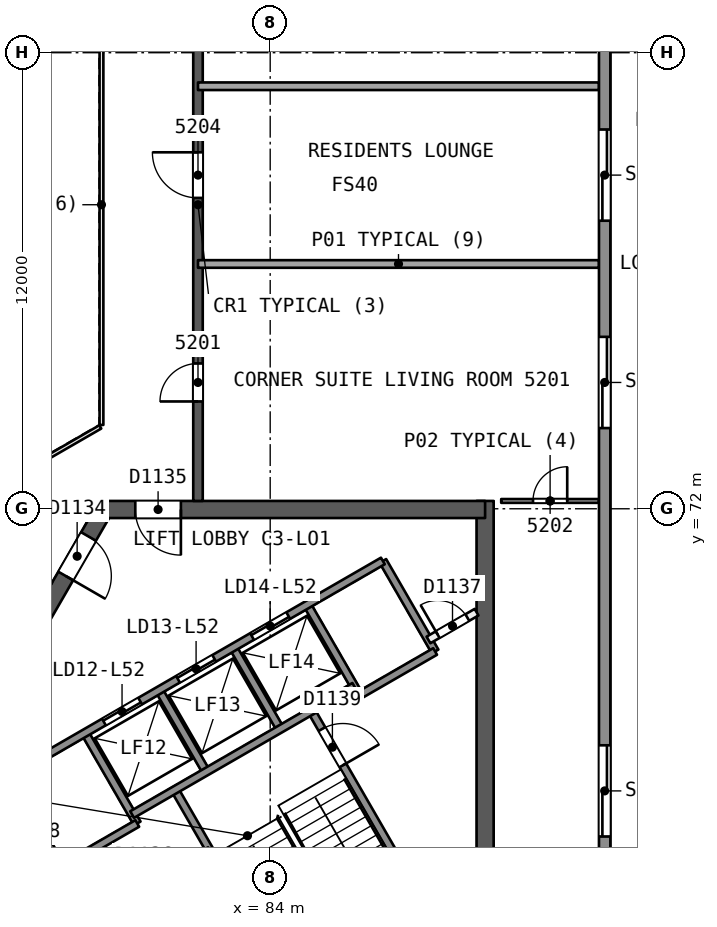
"""IFC4 building model, lengths in metres.
Left out: names, types, materials, properties, quantities, classifications, styles, units other than length and angle.
Written with IfcOpenShell. Run it as: python <this file> out.ifc"""

import sys

from ifc_helpers import new_model, si_unit, direction, frame, frame_2d, origin, place, context, subcontext, project, spatial, rectangle, extrude, element, fill, save


model = new_model("IFC4")
c1 = context("Model", 3, precision=1e-05, world=origin(), true_north=direction((0.0, 1.0)))
c2 = subcontext(c1, "Body", "Model", "MODEL_VIEW")
j1 = project(units=[si_unit("LENGTHUNIT", "METRE"), si_unit("PLANEANGLEUNIT", "RADIAN")], contexts=[c1])
p1 = place(None, origin())
s1 = spatial("IfcSite", under=j1, at=p1, CompositionType="ELEMENT")
p2 = place(p1, origin())
s2 = spatial("IfcBuilding", under=s1, at=p2, CompositionType="ELEMENT")
p3 = place(p2, frame((0.0, 0.0, 213.2)))
s3 = spatial("IfcBuildingStorey", under=s2, at=p3, CompositionType="ELEMENT", Elevation=213.2)
p4 = place(p3, frame((79.63, 71.981, 0.0), z_axis=(0.0, 0.0, 1.0), x_axis=(-0.500002171595, -0.86602415001, 0.0)))
e1 = element("IfcWall", 1, at=p4, inside=s3, PredefinedType="SHEAR", context=c2, shape_type="SweptSolid", body=[
    extrude(rectangle(XDim=10.25, YDim=0.45, at=frame_2d((5.125, 0.0))), origin(), (0.0, 0.0, 1.0), 3.7),
])
p5 = place(p4, frame((0.82, 0.0, 0.0)))
e2 = element("IfcOpeningElement", 2, at=p5, cuts=e1, PredefinedType="OPENING", context=c2, shape_type="SweptSolid", body=[
    extrude(rectangle(XDim=1.2, YDim=2.1, at=frame_2d((0.6, 1.05))), frame((0.0, 0.235, 0.0), z_axis=(0.0, -1.0, 0.0), x_axis=(1.0, 0.0, 0.0)), (0.0, 0.0, 1.0), 0.471),
])
p6 = place(p3, frame((74.617, 63.299, 0.0), z_axis=(0.0, 0.0, 1.0), x_axis=(0.86602594008, -0.499999071108, 0.0)))
e3 = element("IfcWall", 3, at=p6, inside=s3, PredefinedType="SHEAR", context=c2, shape_type="SweptSolid", body=[
    extrude(rectangle(XDim=14.108, YDim=0.45, at=frame_2d((7.054, 0.0))), origin(), (0.0, 0.0, 1.0), 3.7),
])
p7 = place(p3, frame((89.655, 58.002, 0.0), z_axis=(0.0, 0.0, 1.0), x_axis=(0.0, 1.0, 0.0)))
e4 = element("IfcWall", 4, at=p7, inside=s3, PredefinedType="SHEAR", context=c2, shape_type="SweptSolid", body=[
    extrude(rectangle(XDim=14.204, YDim=0.45, at=frame_2d((7.102, 0.0))), origin(), (0.0, 0.0, 1.0), 3.7),
])
p8 = place(p3, frame((89.655, 71.981, 0.0), z_axis=(0.0, 0.0, 1.0), x_axis=(-1.0, 0.0, 0.0)))
e5 = element("IfcWall", 5, at=p8, inside=s3, PredefinedType="SHEAR", context=c2, shape_type="SweptSolid", body=[
    extrude(rectangle(XDim=10.155, YDim=0.45, at=frame_2d((5.078, 0.0))), origin(), (0.0, 0.0, 1.0), 3.7),
])
p9 = place(p8, frame((8.005, 0.0, 0.0)))
e6 = element("IfcOpeningElement", 6, at=p9, cuts=e5, PredefinedType="OPENING", context=c2, shape_type="SweptSolid", body=[
    extrude(rectangle(XDim=1.2, YDim=2.1, at=frame_2d((0.6, 1.05))), frame((0.0, 0.235, 0.0), z_axis=(0.0, -1.0, 0.0), x_axis=(1.0, 0.0, 0.0)), (0.0, 0.0, 1.0), 0.471),
])
p10 = place(p3, frame((82.1, 72.206, 0.0), z_axis=(0.0, 0.0, 1.0), x_axis=(0.0, 1.0, 0.0)))
e7 = element("IfcWall", 7, at=p10, inside=s3, PredefinedType="SHEAR", context=c2, shape_type="SweptSolid", body=[
    extrude(rectangle(XDim=15.588, YDim=0.25, at=frame_2d((7.794, 0.0))), origin(), (0.0, 0.0, 1.0), 3.3),
])
p11 = place(p10, frame((2.618, 0.0, 0.0)))
e8 = element("IfcOpeningElement", 8, at=p11, cuts=e7, PredefinedType="OPENING", context=c2, shape_type="SweptSolid", body=[
    extrude(rectangle(XDim=1.0, YDim=2.1, at=frame_2d((0.5, 1.05))), frame((0.0, 0.135, 0.0), z_axis=(0.0, -1.0, 0.0), x_axis=(1.0, 0.0, 0.0)), (0.0, 0.0, 1.0), 0.271),
])
p12 = place(p10, frame((7.974, 0.0, 0.0)))
e9 = element("IfcOpeningElement", 9, at=p12, cuts=e7, PredefinedType="OPENING", context=c2, shape_type="SweptSolid", body=[
    extrude(rectangle(XDim=1.2, YDim=2.4, at=frame_2d((0.6, 1.2))), frame((0.0, 0.135, 0.0), z_axis=(0.0, -1.0, 0.0), x_axis=(1.0, 0.0, 0.0)), (0.0, 0.0, 1.0), 0.271),
])
p13 = place(p10, frame((12.65, 0.0, 0.0)))
e10 = element("IfcOpeningElement", 10, at=p13, cuts=e7, PredefinedType="OPENING", context=c2, shape_type="SweptSolid", body=[
    extrude(rectangle(XDim=1.2, YDim=2.4, at=frame_2d((0.6, 1.2))), frame((0.0, 0.135, 0.0), z_axis=(0.0, -1.0, 0.0), x_axis=(1.0, 0.0, 0.0)), (0.0, 0.0, 1.0), 0.271),
])
p14 = place(p3, frame((90.079, 72.206, 0.0), z_axis=(0.0, 0.0, 1.0), x_axis=(1.0, 0.0, 0.0)))
e11 = element("IfcWall", 11, at=p14, inside=s3, PredefinedType="PARTITIONING", context=c2, shape_type="SweptSolid", body=[
    extrude(rectangle(XDim=2.573, YDim=0.1, at=frame_2d((1.287, 0.0))), origin(), (0.0, 0.0, 1.0), 3.3),
])
p15 = place(p14, frame((0.837, 0.0, 0.0)))
e12 = element("IfcOpeningElement", 12, at=p15, cuts=e11, PredefinedType="OPENING", context=c2, shape_type="SweptSolid", body=[
    extrude(rectangle(XDim=0.9, YDim=2.1, at=frame_2d((0.45, 1.05))), frame((0.0, 0.061, 0.0), z_axis=(0.0, -1.0, 0.0), x_axis=(1.0, 0.0, 0.0)), (0.0, 0.0, 1.0), 0.121),
])
for number, where, z_axis, x_axis in (
    (13, (92.652, 78.441, 0.0), (0.0, 0.0, 1.0), (-1.0, 0.0, 0.0)),
    (14, (92.652, 83.118, 0.0), (0.0, 0.0, 1.0), (-1.0, 0.0, 0.0)),
):
    element("IfcWall", number, at=place(p3, frame(where, z_axis=z_axis, x_axis=x_axis)), inside=s3, PredefinedType="PARTITIONING", context=c2, shape_type="SweptSolid", body=[
        extrude(rectangle(XDim=10.552, YDim=0.2, at=frame_2d((5.276, 0.0))), origin(), (0.0, 0.0, 1.0), 3.3),
    ])
p16 = place(p3, frame((92.801, 105.596, 0.0), z_axis=(0.0, 0.0, 1.0), x_axis=(0.0, -1.0, 0.0)))
e15 = element("IfcWall", 15, at=p16, inside=s3, PredefinedType="SOLIDWALL", context=c2, shape_type="SweptSolid", body=[
    extrude(rectangle(XDim=51.191, YDim=0.3, at=frame_2d((25.596, 0.0))), origin(), (0.0, 0.0, 1.0), 3.3),
])
p17 = place(p16, frame((9.996, 0.0, 0.0)))
e16 = element("IfcOpeningElement", 16, at=p17, cuts=e15, PredefinedType="OPENING", context=c2, shape_type="SweptSolid", body=[
    extrude(rectangle(XDim=2.4, YDim=2.4, at=frame_2d((1.2, 1.2))), frame((0.0, 0.161, 0.0), z_axis=(0.0, -1.0, 0.0), x_axis=(1.0, 0.0, 0.0)), (0.0, 0.0, 1.0), 0.321),
])
p18 = place(p16, frame((29.072, 0.0, 0.0)))
e17 = element("IfcOpeningElement", 17, at=p18, cuts=e15, PredefinedType="OPENING", context=c2, shape_type="SweptSolid", body=[
    extrude(rectangle(XDim=2.4, YDim=2.4, at=frame_2d((1.2, 1.2))), frame((0.0, 0.161, 0.0), z_axis=(0.0, -1.0, 0.0), x_axis=(1.0, 0.0, 0.0)), (0.0, 0.0, 1.0), 0.321),
])
p19 = place(p16, frame((39.819, 0.0, 0.0)))
e18 = element("IfcOpeningElement", 18, at=p19, cuts=e15, PredefinedType="OPENING", context=c2, shape_type="SweptSolid", body=[
    extrude(rectangle(XDim=2.4, YDim=2.4, at=frame_2d((1.2, 1.2))), frame((0.0, 0.161, 0.0), z_axis=(0.0, -1.0, 0.0), x_axis=(1.0, 0.0, 0.0)), (0.0, 0.0, 1.0), 0.321),
])
p20 = place(p16, frame((23.616, 0.0, 0.0)))
e19 = element("IfcOpeningElement", 19, at=p20, cuts=e15, PredefinedType="OPENING", context=c2, shape_type="SweptSolid", body=[
    extrude(rectangle(XDim=2.4, YDim=2.4, at=frame_2d((1.2, 1.2))), frame((0.0, 0.161, 0.0), z_axis=(0.0, -1.0, 0.0), x_axis=(1.0, 0.0, 0.0)), (0.0, 0.0, 1.0), 0.321),
])
p21 = place(p3, frame((43.933, 82.619, 0.0), z_axis=(0.0, 0.0, 1.0), x_axis=(0.866026349667, 0.49999836168, 0.0)))
e20 = element("IfcWall", 20, at=p21, inside=s3, PredefinedType="SOLIDWALL", context=c2, shape_type="SweptSolid", body=[
    extrude(rectangle(XDim=51.192, YDim=0.3, at=frame_2d((25.596, 0.0))), origin(), (0.0, 0.0, 1.0), 3.3),
])
p22 = place(p21, frame((24.552, 0.0, 0.0)))
e21 = element("IfcOpeningElement", 21, at=p22, cuts=e20, PredefinedType="OPENING", context=c2, shape_type="SweptSolid", body=[
    extrude(rectangle(XDim=2.4, YDim=2.4, at=frame_2d((1.2, 1.2))), frame((0.0, 0.161, 0.0), z_axis=(0.0, -1.0, 0.0), x_axis=(1.0, 0.0, 0.0)), (0.0, 0.0, 1.0), 0.321),
])
p23 = place(p21, frame((29.228, 0.0, 0.0)))
e22 = element("IfcOpeningElement", 22, at=p23, cuts=e20, PredefinedType="OPENING", context=c2, shape_type="SweptSolid", body=[
    extrude(rectangle(XDim=2.4, YDim=2.4, at=frame_2d((1.2, 1.2))), frame((0.0, 0.161, 0.0), z_axis=(0.0, -1.0, 0.0), x_axis=(1.0, 0.0, 0.0)), (0.0, 0.0, 1.0), 0.321),
])
p24 = place(p21, frame((39.819, 0.0, 0.0)))
e23 = element("IfcOpeningElement", 23, at=p24, cuts=e20, PredefinedType="OPENING", context=c2, shape_type="SweptSolid", body=[
    extrude(rectangle(XDim=2.4, YDim=2.4, at=frame_2d((1.2, 1.2))), frame((0.0, 0.161, 0.0), z_axis=(0.0, -1.0, 0.0), x_axis=(1.0, 0.0, 0.0)), (0.0, 0.0, 1.0), 0.321),
])
p25 = place(p21, frame((19.719, 0.0, 0.0)))
e24 = element("IfcOpeningElement", 24, at=p25, cuts=e20, PredefinedType="OPENING", context=c2, shape_type="SweptSolid", body=[
    extrude(rectangle(XDim=2.4, YDim=2.4, at=frame_2d((1.2, 1.2))), frame((0.0, 0.161, 0.0), z_axis=(0.0, -1.0, 0.0), x_axis=(1.0, 0.0, 0.0)), (0.0, 0.0, 1.0), 0.321),
])
p26 = place(p21, frame((8.993, 0.0, 0.0)))
e25 = element("IfcOpeningElement", 25, at=p26, cuts=e20, PredefinedType="OPENING", context=c2, shape_type="SweptSolid", body=[
    extrude(rectangle(XDim=2.4, YDim=2.4, at=frame_2d((1.2, 1.2))), frame((0.0, 0.161, 0.0), z_axis=(0.0, -1.0, 0.0), x_axis=(1.0, 0.0, 0.0)), (0.0, 0.0, 1.0), 0.321),
])
p27 = place(p3, frame((88.266, 51.786, 0.0), z_axis=(0.0, 0.0, 1.0), x_axis=(-0.866026349667, 0.49999836168, 0.0)))
e26 = element("IfcWall", 26, at=p27, inside=s3, PredefinedType="SOLIDWALL", context=c2, shape_type="SweptSolid", body=[
    extrude(rectangle(XDim=51.192, YDim=0.3, at=frame_2d((25.596, 0.0))), origin(), (0.0, 0.0, 1.0), 3.3),
])
p28 = place(p27, frame((24.864, 0.0, 0.0)))
e27 = element("IfcOpeningElement", 27, at=p28, cuts=e26, PredefinedType="OPENING", context=c2, shape_type="SweptSolid", body=[
    extrude(rectangle(XDim=2.4, YDim=2.4, at=frame_2d((1.2, 1.2))), frame((0.0, 0.161, 0.0), z_axis=(0.0, -1.0, 0.0), x_axis=(1.0, 0.0, 0.0)), (0.0, 0.0, 1.0), 0.321),
])
p29 = place(p27, frame((19.719, 0.0, 0.0)))
e28 = element("IfcOpeningElement", 28, at=p29, cuts=e26, PredefinedType="OPENING", context=c2, shape_type="SweptSolid", body=[
    extrude(rectangle(XDim=2.4, YDim=2.4, at=frame_2d((1.2, 1.2))), frame((0.0, 0.161, 0.0), z_axis=(0.0, -1.0, 0.0), x_axis=(1.0, 0.0, 0.0)), (0.0, 0.0, 1.0), 0.321),
])
p30 = place(p27, frame((8.993, 0.0, 0.0)))
e29 = element("IfcOpeningElement", 29, at=p30, cuts=e26, PredefinedType="OPENING", context=c2, shape_type="SweptSolid", body=[
    extrude(rectangle(XDim=2.4, YDim=2.4, at=frame_2d((1.2, 1.2))), frame((0.0, 0.161, 0.0), z_axis=(0.0, -1.0, 0.0), x_axis=(1.0, 0.0, 0.0)), (0.0, 0.0, 1.0), 0.321),
])
p31 = place(p27, frame((38.484, 0.0, 0.0)))
e30 = element("IfcOpeningElement", 30, at=p31, cuts=e26, PredefinedType="OPENING", context=c2, shape_type="SweptSolid", body=[
    extrude(rectangle(XDim=2.4, YDim=2.4, at=frame_2d((1.2, 1.2))), frame((0.0, 0.161, 0.0), z_axis=(0.0, -1.0, 0.0), x_axis=(1.0, 0.0, 0.0)), (0.0, 0.0, 1.0), 0.321),
])
for number, where, z_axis, x_axis in (
    (31, (77.135, 64.952, 0.0), (0.0, 0.0, 1.0), (0.5, -0.866, 0.0)),
    (32, (79.127, 66.102, 0.0), (0.0, 0.0, 1.0), (0.5, -0.866, 0.0)),
):
    element("IfcWall", number, at=place(p3, frame(where, z_axis=z_axis, x_axis=x_axis)), inside=s3, PredefinedType="SOLIDWALL", context=c2, shape_type="SweptSolid", body=[
        extrude(rectangle(XDim=2.75, YDim=0.2, at=frame_2d((1.375, 0.0))), origin(), (0.0, 0.0, 1.0), 3.3),
    ])
p32 = place(p3, frame((81.493, 64.604, 0.0), z_axis=(0.0, 0.0, 1.0), x_axis=(0.500006057782, -0.866021906294, 0.0)))
e33 = element("IfcWall", 33, at=p32, inside=s3, PredefinedType="SOLIDWALL", context=c2, shape_type="SweptSolid", body=[
    extrude(rectangle(XDim=7.7, YDim=0.2, at=frame_2d((3.85, 0.0))), origin(), (0.0, 0.0, 1.0), 3.3),
])
for number, where, z_axis, x_axis in (
    (34, (81.076, 67.227, 0.0), (0.0, 0.0, 1.0), (0.5, -0.866, 0.0)),
    (35, (83.024, 68.352, 0.0), (0.0, 0.0, 1.0), (0.5, -0.866, 0.0)),
):
    element("IfcWall", number, at=place(p3, frame(where, z_axis=z_axis, x_axis=x_axis)), inside=s3, PredefinedType="SOLIDWALL", context=c2, shape_type="SweptSolid", body=[
        extrude(rectangle(XDim=2.48, YDim=0.2, at=frame_2d((1.24, 0.0))), origin(), (0.0, 0.0, 1.0), 3.3),
    ])
p33 = place(p3, frame((85.087, 66.679, 0.0), z_axis=(0.0, 0.0, 1.0), x_axis=(0.500019787375, -0.866013979237, 0.0)))
e36 = element("IfcWall", 36, at=p33, inside=s3, PredefinedType="SOLIDWALL", context=c2, shape_type="SweptSolid", body=[
    extrude(rectangle(XDim=7.7, YDim=0.2, at=frame_2d((3.85, 0.0))), origin(), (0.0, 0.0, 1.0), 3.3),
])
p34 = place(p33, frame((0.55, 0.0, 0.0)))
e37 = element("IfcOpeningElement", 37, at=p34, cuts=e36, PredefinedType="OPENING", context=c2, shape_type="SweptSolid", body=[
    extrude(rectangle(XDim=1.1, YDim=2.1, at=frame_2d((0.55, 1.05))), frame((0.0, 0.11, 0.0), z_axis=(0.0, -1.0, 0.0), x_axis=(1.0, 0.0, 0.0)), (0.0, 0.0, 1.0), 0.221),
])
for number, where, z_axis, x_axis in (
    (38, (84.973, 69.477, 0.0), (0.0, 0.0, 1.0), (0.5, -0.866, 0.0)),
    (39, (86.965, 70.626, 0.0), (0.0, 0.0, 1.0), (0.5, -0.866, 0.0)),
):
    element("IfcWall", number, at=place(p3, frame(where, z_axis=z_axis, x_axis=x_axis)), inside=s3, PredefinedType="SOLIDWALL", context=c2, shape_type="SweptSolid", body=[
        extrude(rectangle(XDim=2.75, YDim=0.2, at=frame_2d((1.375, 0.0))), origin(), (0.0, 0.0, 1.0), 3.3),
    ])
p35 = place(p3, frame((77.135, 64.952, 0.0), z_axis=(0.0, 0.0, 1.0), x_axis=(0.866031916153, 0.499988720078, 0.0)))
e40 = element("IfcWall", 40, at=p35, inside=s3, PredefinedType="SOLIDWALL", context=c2, shape_type="SweptSolid", body=[
    extrude(rectangle(XDim=11.35, YDim=0.2, at=frame_2d((5.675, 0.0))), origin(), (0.0, 0.0, 1.0), 3.3),
])
p36 = place(p35, frame((2.875, 0.0, 0.0)))
e41 = element("IfcOpeningElement", 41, at=p36, cuts=e40, PredefinedType="OPENING", context=c2, shape_type="SweptSolid", body=[
    extrude(rectangle(XDim=1.1, YDim=2.1, at=frame_2d((0.55, 1.05))), frame((0.0, 0.11, 0.0), z_axis=(0.0, -1.0, 0.0), x_axis=(1.0, 0.0, 0.0)), (0.0, 0.0, 1.0), 0.221),
])
p37 = place(p35, frame((5.125, 0.0, 0.0)))
e42 = element("IfcOpeningElement", 42, at=p37, cuts=e40, PredefinedType="OPENING", context=c2, shape_type="SweptSolid", body=[
    extrude(rectangle(XDim=1.1, YDim=2.1, at=frame_2d((0.55, 1.05))), frame((0.0, 0.11, 0.0), z_axis=(0.0, -1.0, 0.0), x_axis=(1.0, 0.0, 0.0)), (0.0, 0.0, 1.0), 0.221),
])
p38 = place(p35, frame((7.375, 0.0, 0.0)))
e43 = element("IfcOpeningElement", 43, at=p38, cuts=e40, PredefinedType="OPENING", context=c2, shape_type="SweptSolid", body=[
    extrude(rectangle(XDim=1.1, YDim=2.1, at=frame_2d((0.55, 1.05))), frame((0.0, 0.11, 0.0), z_axis=(0.0, -1.0, 0.0), x_axis=(1.0, 0.0, 0.0)), (0.0, 0.0, 1.0), 0.221),
])
p39 = place(p3, frame((88.165, 68.548, 0.0), z_axis=(0.0, 0.0, 1.0), x_axis=(0.866013036001, 0.500021421018, 0.0)))
e44 = element("IfcWall", 44, at=p39, inside=s3, PredefinedType="PARTITIONING", context=c2, shape_type="SweptSolid", body=[
    extrude(rectangle(XDim=1.461, YDim=0.2, at=frame_2d((0.73, 0.0))), origin(), (0.0, 0.0, 1.0), 3.3),
])
p40 = place(p39, frame((0.281, 0.0, 0.0)))
e45 = element("IfcOpeningElement", 45, at=p40, cuts=e44, PredefinedType="OPENING", context=c2, shape_type="SweptSolid", body=[
    extrude(rectangle(XDim=0.9, YDim=2.1, at=frame_2d((0.45, 1.05))), frame((0.0, 0.11, 0.0), z_axis=(0.0, -1.0, 0.0), x_axis=(1.0, 0.0, 0.0)), (0.0, 0.0, 1.0), 0.221),
])
p41 = place(p3, frame((80.367, 63.954, 0.0), z_axis=(0.0, 0.0, 1.0), x_axis=(0.866026575979, 0.499997969693, 0.0)))
e46 = element("IfcWall", 46, at=p41, inside=s3, PredefinedType="SOLIDWALL", context=c2, shape_type="SweptSolid", body=[
    extrude(rectangle(XDim=6.75, YDim=0.2, at=frame_2d((3.375, 0.0))), origin(), (0.0, 0.0, 1.0), 3.3),
])
p42 = place(p3, frame((78.51, 62.57, 0.0), z_axis=(0.0, 0.0, 1.0), x_axis=(0.866053019151, 0.499952165731, 0.0)))
e47 = element("IfcWall", 47, at=p42, inside=s3, PredefinedType="SOLIDWALL", context=c2, shape_type="SweptSolid", body=[
    extrude(rectangle(XDim=2.3, YDim=0.2, at=frame_2d((1.15, 0.0))), origin(), (0.0, 0.0, 1.0), 3.3),
])
p43 = place(p3, frame((86.348, 67.095, 0.0), z_axis=(0.0, 0.0, 1.0), x_axis=(0.86602648383, 0.499998129301, 0.0)))
e48 = element("IfcWall", 48, at=p43, inside=s3, PredefinedType="SOLIDWALL", context=c2, shape_type="SweptSolid", body=[
    extrude(rectangle(XDim=2.3, YDim=0.2, at=frame_2d((1.15, 0.0))), origin(), (0.0, 0.0, 1.0), 3.3),
])
p44 = place(p3, frame((78.97, 61.046, 0.0), z_axis=(0.0, 0.0, 1.0), x_axis=(0.866044057189, 0.499967689963, 0.0)))
e49 = element("IfcWall", 49, at=p44, inside=s3, PredefinedType="PARTITIONING", context=c2, shape_type="SweptSolid", body=[
    extrude(rectangle(XDim=3.964, YDim=0.15, at=frame_2d((1.982, 0.0))), origin(), (0.0, 0.0, 1.0), 3.3),
])
p45 = place(p44, frame((1.532, 0.0, 0.0)))
e50 = element("IfcOpeningElement", 50, at=p45, cuts=e49, PredefinedType="OPENING", context=c2, shape_type="SweptSolid", body=[
    extrude(rectangle(XDim=0.9, YDim=2.1, at=frame_2d((0.45, 1.05))), frame((0.0, 0.085, 0.0), z_axis=(0.0, -1.0, 0.0), x_axis=(1.0, 0.0, 0.0)), (0.0, 0.0, 1.0), 0.171),
])
p46 = place(p3, frame((79.56, 74.206, 0.0), z_axis=(0.0, 0.0, 1.0), x_axis=(0.0, 1.0, 0.0)))
e51 = element("IfcWall", 51, at=p46, inside=s3, PredefinedType="PARTITIONING", context=c2, shape_type="SweptSolid", body=[
    extrude(rectangle(XDim=11.588, YDim=0.1, at=frame_2d((5.794, 0.0))), origin(), (0.0, 0.0, 1.0), 3.3),
])
p47 = place(p3, frame((77.798, 73.154, 0.0), z_axis=(0.0, 0.0, 1.0), x_axis=(0.866041268327, 0.499972520799, 0.0)))
e52 = element("IfcWall", 52, at=p47, inside=s3, PredefinedType="PARTITIONING", context=c2, shape_type="SweptSolid", body=[
    extrude(rectangle(XDim=2.0, YDim=0.1, at=frame_2d((1.0, 0.0))), origin(), (0.0, 0.0, 1.0), 3.3),
])
p48 = place(p11, origin())
e53 = element("IfcDoor", 53, at=p48, inside=s3, OperationType="SINGLE_SWING_LEFT", PredefinedType="NOTDEFINED", context=c2, shape_type="SweptSolid", body=[
    extrude(rectangle(XDim=1.0, YDim=2.1, at=frame_2d((0.5, 1.05))), frame((0.0, 0.025, 0.0), z_axis=(0.0, -1.0, 0.0), x_axis=(1.0, 0.0, 0.0)), (0.0, 0.0, 1.0), 0.05),
])
fill(e8, e53)
p49 = place(p15, origin())
e54 = element("IfcDoor", 54, at=p49, inside=s3, OperationType="SINGLE_SWING_RIGHT", PredefinedType="NOTDEFINED", context=c2, shape_type="SweptSolid", body=[
    extrude(rectangle(XDim=0.9, YDim=2.1, at=frame_2d((0.45, 1.05))), frame((0.0, 0.025, 0.0), z_axis=(0.0, -1.0, 0.0), x_axis=(1.0, 0.0, 0.0)), (0.0, 0.0, 1.0), 0.05),
])
fill(e12, e54)
p50 = place(p12, origin())
e55 = element("IfcDoor", 55, at=p50, inside=s3, OperationType="SINGLE_SWING_RIGHT", PredefinedType="NOTDEFINED", context=c2, shape_type="SweptSolid", body=[
    extrude(rectangle(XDim=1.2, YDim=2.4, at=frame_2d((0.6, 1.2))), frame((0.0, 0.025, 0.0), z_axis=(0.0, -1.0, 0.0), x_axis=(1.0, 0.0, 0.0)), (0.0, 0.0, 1.0), 0.05),
])
fill(e9, e55)
p51 = place(p18, origin())
e56 = element("IfcDoor", 56, at=p51, inside=s3, OperationType="SLIDING_TO_RIGHT", PredefinedType="NOTDEFINED", context=c2, shape_type="SweptSolid", body=[
    extrude(rectangle(XDim=2.4, YDim=2.4, at=frame_2d((1.2, 1.2))), frame((0.0, 0.025, 0.0), z_axis=(0.0, -1.0, 0.0), x_axis=(1.0, 0.0, 0.0)), (0.0, 0.0, 1.0), 0.05),
])
fill(e17, e56)
p52 = place(p19, origin())
e57 = element("IfcDoor", 57, at=p52, inside=s3, OperationType="SLIDING_TO_LEFT", PredefinedType="NOTDEFINED", context=c2, shape_type="SweptSolid", body=[
    extrude(rectangle(XDim=2.4, YDim=2.4, at=frame_2d((1.2, 1.2))), frame((0.0, 0.025, 0.0), z_axis=(0.0, -1.0, 0.0), x_axis=(1.0, 0.0, 0.0)), (0.0, 0.0, 1.0), 0.05),
])
fill(e18, e57)
p53 = place(p20, origin())
e58 = element("IfcDoor", 58, at=p53, inside=s3, OperationType="SLIDING_TO_RIGHT", PredefinedType="NOTDEFINED", context=c2, shape_type="SweptSolid", body=[
    extrude(rectangle(XDim=2.4, YDim=2.4, at=frame_2d((1.2, 1.2))), frame((0.0, 0.025, 0.0), z_axis=(0.0, -1.0, 0.0), x_axis=(1.0, 0.0, 0.0)), (0.0, 0.0, 1.0), 0.05),
])
fill(e19, e58)
p54 = place(p5, origin())
e59 = element("IfcDoor", 59, at=p54, inside=s3, OperationType="SINGLE_SWING_RIGHT", PredefinedType="NOTDEFINED", context=c2, shape_type="SweptSolid", body=[
    extrude(rectangle(XDim=1.2, YDim=2.1, at=frame_2d((0.6, 1.05))), frame((0.0, 0.025, 0.0), z_axis=(0.0, -1.0, 0.0), x_axis=(1.0, 0.0, 0.0)), (0.0, 0.0, 1.0), 0.05),
])
fill(e2, e59)
p55 = place(p9, origin())
e60 = element("IfcDoor", 60, at=p55, inside=s3, OperationType="SINGLE_SWING_LEFT", PredefinedType="NOTDEFINED", context=c2, shape_type="SweptSolid", body=[
    extrude(rectangle(XDim=1.2, YDim=2.1, at=frame_2d((0.6, 1.05))), frame((0.0, 0.025, 0.0), z_axis=(0.0, -1.0, 0.0), x_axis=(1.0, 0.0, 0.0)), (0.0, 0.0, 1.0), 0.05),
])
fill(e6, e60)
p56 = place(p36, origin())
e61 = element("IfcDoor", 61, at=p56, inside=s3, OperationType="SLIDING_TO_LEFT", PredefinedType="NOTDEFINED", context=c2, shape_type="SweptSolid", body=[
    extrude(rectangle(XDim=1.1, YDim=2.1, at=frame_2d((0.55, 1.05))), frame((0.0, 0.025, 0.0), z_axis=(0.0, -1.0, 0.0), x_axis=(1.0, 0.0, 0.0)), (0.0, 0.0, 1.0), 0.05),
])
fill(e41, e61)
p57 = place(p37, origin())
e62 = element("IfcDoor", 62, at=p57, inside=s3, OperationType="SLIDING_TO_RIGHT", PredefinedType="NOTDEFINED", context=c2, shape_type="SweptSolid", body=[
    extrude(rectangle(XDim=1.1, YDim=2.1, at=frame_2d((0.55, 1.05))), frame((0.0, 0.025, 0.0), z_axis=(0.0, -1.0, 0.0), x_axis=(1.0, 0.0, 0.0)), (0.0, 0.0, 1.0), 0.05),
])
fill(e42, e62)
p58 = place(p38, origin())
e63 = element("IfcDoor", 63, at=p58, inside=s3, OperationType="SLIDING_TO_LEFT", PredefinedType="NOTDEFINED", context=c2, shape_type="SweptSolid", body=[
    extrude(rectangle(XDim=1.1, YDim=2.1, at=frame_2d((0.55, 1.05))), frame((0.0, 0.025, 0.0), z_axis=(0.0, -1.0, 0.0), x_axis=(1.0, 0.0, 0.0)), (0.0, 0.0, 1.0), 0.05),
])
fill(e43, e63)
p59 = place(p40, origin())
e64 = element("IfcDoor", 64, at=p59, inside=s3, OperationType="SINGLE_SWING_LEFT", PredefinedType="NOTDEFINED", context=c2, shape_type="SweptSolid", body=[
    extrude(rectangle(XDim=0.9, YDim=2.1, at=frame_2d((0.45, 1.05))), frame((0.0, 0.025, 0.0), z_axis=(0.0, -1.0, 0.0), x_axis=(1.0, 0.0, 0.0)), (0.0, 0.0, 1.0), 0.05),
])
fill(e45, e64)
p60 = place(p34, origin())
e65 = element("IfcDoor", 65, at=p60, inside=s3, OperationType="SINGLE_SWING_RIGHT", PredefinedType="NOTDEFINED", context=c2, shape_type="SweptSolid", body=[
    extrude(rectangle(XDim=1.1, YDim=2.1, at=frame_2d((0.55, 1.05))), frame((0.0, 0.025, 0.0), z_axis=(0.0, -1.0, 0.0), x_axis=(1.0, 0.0, 0.0)), (0.0, 0.0, 1.0), 0.05),
])
fill(e37, e65)
save(model, sys.argv[1])
